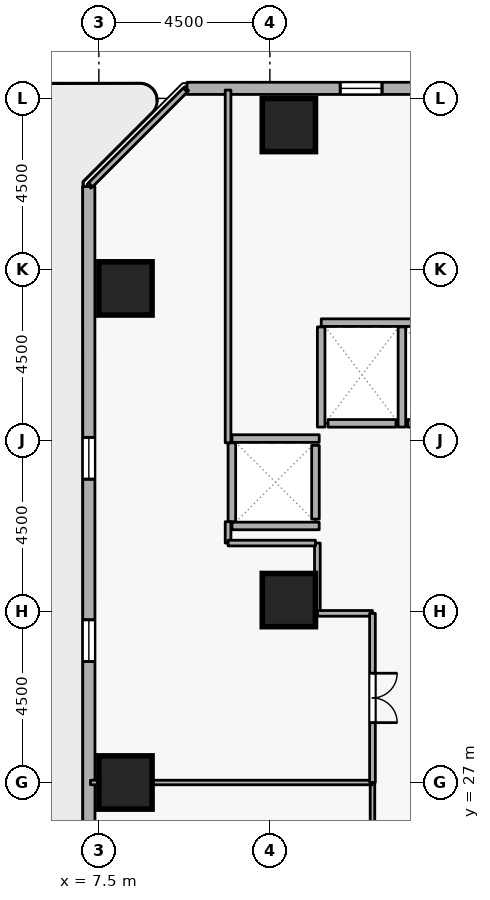
"""IFC4 building model, lengths in metres.
Left out: names, types, materials, properties, quantities, classifications, styles, units other than length and angle.
Written with IfcOpenShell. Run it as: python <this file> out.ifc"""

import sys

from ifc_helpers import new_model, si_unit, direction, frame, frame_2d, origin, origin_2d, place, context, subcontext, project, spatial, rectangle, extrude, element, fill, save


model = new_model("IFC4")
c1 = context("Model", 3, precision=1e-05, world=origin(), true_north=direction((0.0, 1.0)))
c2 = subcontext(c1, "Body", "Model", "MODEL_VIEW")
j1 = project(units=[si_unit("LENGTHUNIT", "METRE"), si_unit("PLANEANGLEUNIT", "RADIAN")], contexts=[c1])
p1 = place(None, origin())
s1 = spatial("IfcSite", under=j1, at=p1, CompositionType="ELEMENT")
p2 = place(p1, origin())
s2 = spatial("IfcBuilding", under=s1, at=p2, CompositionType="ELEMENT")
p3 = place(p2, frame((0.0, 0.0, 49.5)))
s3 = spatial("IfcBuildingStorey", under=s2, at=p3, CompositionType="ELEMENT", Elevation=49.5)
for number, where, z_axis, x_axis in (
    (1, (12.5, 44.3, 0.0), (0.0, 0.0, 1.0), (1.0, 0.0, 0.0)),
    (2, (8.2, 27.0, 0.0), (0.0, 0.0, 1.0), (1.0, 0.0, 0.0)),
    (3, (8.2, 40.0, 0.0), (0.0, 0.0, 1.0), (1.0, 0.0, 0.0)),
    (4, (12.5, 31.8, 0.0), (0.0, 0.0, 1.0), (1.0, 0.0, 0.0)),
):
    element("IfcColumn", number, at=place(p3, frame(where, z_axis=z_axis, x_axis=x_axis)), inside=s3, PredefinedType="COLUMN", context=c2, shape_type="SweptSolid", body=[
        extrude(rectangle(XDim=1.4, YDim=1.4, at=origin_2d()), origin(), (0.0, 0.0, 1.0), 4.2),
    ])
p4 = place(p3, frame((45.552, 45.26, 0.0), z_axis=(0.0, 0.0, 1.0), x_axis=(-0.999999988703, 0.000150313265, 0.0)))
e5 = element("IfcWall", 5, at=p4, inside=s3, PredefinedType="STANDARD", context=c2, shape_type="SweptSolid", body=[
    extrude(rectangle(XDim=35.733, YDim=0.32, at=frame_2d((17.866, 0.0))), origin(), (0.0, 0.0, 1.0), 3.3),
])
p5 = place(p4, frame((1.8, 0.0, 0.72)))
e6 = element("IfcOpeningElement", 6, at=p5, cuts=e5, PredefinedType="OPENING", context=c2, shape_type="SweptSolid", body=[
    extrude(rectangle(XDim=1.1, YDim=1.8, at=frame_2d((0.55, 0.9))), frame((0.0, 0.17, 0.0), z_axis=(0.0, -1.0, 0.0), x_axis=(1.0, 0.0, 0.0)), (0.0, 0.0, 1.0), 0.34),
])
p6 = place(p4, frame((11.4, 0.0, 0.72)))
e7 = element("IfcOpeningElement", 7, at=p6, cuts=e5, PredefinedType="OPENING", context=c2, shape_type="SweptSolid", body=[
    extrude(rectangle(XDim=1.1, YDim=1.8, at=frame_2d((0.55, 0.9))), frame((0.0, 0.17, 0.0), z_axis=(0.0, -1.0, 0.0), x_axis=(1.0, 0.0, 0.0)), (0.0, 0.0, 1.0), 0.34),
])
p7 = place(p4, frame((16.2, 0.0, 0.72)))
e8 = element("IfcOpeningElement", 8, at=p7, cuts=e5, PredefinedType="OPENING", context=c2, shape_type="SweptSolid", body=[
    extrude(rectangle(XDim=1.1, YDim=1.8, at=frame_2d((0.55, 0.9))), frame((0.0, 0.17, 0.0), z_axis=(0.0, -1.0, 0.0), x_axis=(1.0, 0.0, 0.0)), (0.0, 0.0, 1.0), 0.34),
])
p8 = place(p4, frame((25.8, 0.0, 0.72)))
e9 = element("IfcOpeningElement", 9, at=p8, cuts=e5, PredefinedType="OPENING", context=c2, shape_type="SweptSolid", body=[
    extrude(rectangle(XDim=1.1, YDim=1.8, at=frame_2d((0.55, 0.9))), frame((0.0, 0.17, 0.0), z_axis=(0.0, -1.0, 0.0), x_axis=(1.0, 0.0, 0.0)), (0.0, 0.0, 1.0), 0.34),
])
p9 = place(p4, frame((30.6, 0.0, 0.72)))
e10 = element("IfcOpeningElement", 10, at=p9, cuts=e5, PredefinedType="OPENING", context=c2, shape_type="SweptSolid", body=[
    extrude(rectangle(XDim=1.1, YDim=1.8, at=frame_2d((0.55, 0.9))), frame((0.0, 0.17, 0.0), z_axis=(0.0, -1.0, 0.0), x_axis=(1.0, 0.0, 0.0)), (0.0, 0.0, 1.0), 0.34),
])
p10 = place(p3, frame((7.235, 42.681, 0.0), z_axis=(0.0, 0.0, 1.0), x_axis=(0.000150313265, -0.999999988703, 0.0)))
e11 = element("IfcWall", 11, at=p10, inside=s3, PredefinedType="STANDARD", context=c2, shape_type="SweptSolid", body=[
    extrude(rectangle(XDim=35.733, YDim=0.32, at=frame_2d((17.866, 0.0))), origin(), (0.0, 0.0, 1.0), 3.3),
])
p11 = place(p10, frame((19.591, 0.0, 0.0)))
e12 = element("IfcOpeningElement", 12, at=p11, cuts=e11, PredefinedType="OPENING", context=c2, shape_type="SweptSolid", body=[
    extrude(rectangle(XDim=1.15, YDim=2.1, at=frame_2d((0.575, 1.05))), frame((0.0, 0.17, 0.0), z_axis=(0.0, -1.0, 0.0), x_axis=(1.0, 0.0, 0.0)), (0.0, 0.0, 1.0), 0.34),
])
p12 = place(p10, frame((6.6, 0.0, 0.72)))
e13 = element("IfcOpeningElement", 13, at=p12, cuts=e11, PredefinedType="OPENING", context=c2, shape_type="SweptSolid", body=[
    extrude(rectangle(XDim=1.1, YDim=1.8, at=frame_2d((0.55, 0.9))), frame((0.0, 0.17, 0.0), z_axis=(0.0, -1.0, 0.0), x_axis=(1.0, 0.0, 0.0)), (0.0, 0.0, 1.0), 0.34),
])
p13 = place(p10, frame((11.4, 0.0, 0.72)))
e14 = element("IfcOpeningElement", 14, at=p13, cuts=e11, PredefinedType="OPENING", context=c2, shape_type="SweptSolid", body=[
    extrude(rectangle(XDim=1.1, YDim=1.8, at=frame_2d((0.55, 0.9))), frame((0.0, 0.17, 0.0), z_axis=(0.0, -1.0, 0.0), x_axis=(1.0, 0.0, 0.0)), (0.0, 0.0, 1.0), 0.34),
])
p14 = place(p10, frame((25.8, 0.0, 0.72)))
e15 = element("IfcOpeningElement", 15, at=p14, cuts=e11, PredefinedType="OPENING", context=c2, shape_type="SweptSolid", body=[
    extrude(rectangle(XDim=1.1, YDim=1.8, at=frame_2d((0.55, 0.9))), frame((0.0, 0.17, 0.0), z_axis=(0.0, -1.0, 0.0), x_axis=(1.0, 0.0, 0.0)), (0.0, 0.0, 1.0), 0.34),
])
p15 = place(p3, frame((17.37, 36.45, 0.0), z_axis=(0.0, 0.0, 1.0), x_axis=(-1.0, 0.0, 0.0)))
e16 = element("IfcWall", 16, at=p15, inside=s3, PredefinedType="STANDARD", context=c2, shape_type="SweptSolid", body=[
    extrude(rectangle(XDim=1.74, YDim=0.2, at=frame_2d((0.87, 0.0))), origin(), (0.0, 0.0, 1.0), 3.94),
])
p16 = place(p3, frame((15.32, 36.45, 0.0), z_axis=(0.0, 0.0, 1.0), x_axis=(-1.0, 0.0, 0.0)))
e17 = element("IfcWall", 17, at=p16, inside=s3, PredefinedType="STANDARD", context=c2, shape_type="SweptSolid", body=[
    extrude(rectangle(XDim=1.79, YDim=0.2, at=frame_2d((0.895, 0.0))), origin(), (0.0, 0.0, 1.0), 3.94),
])
p17 = place(p3, frame((13.2, 33.93, 0.0), z_axis=(0.0, 0.0, 1.0), x_axis=(0.0, 1.0, 0.0)))
e18 = element("IfcWall", 18, at=p17, inside=s3, PredefinedType="STANDARD", context=c2, shape_type="SweptSolid", body=[
    extrude(rectangle(XDim=1.94, YDim=0.2, at=frame_2d((0.97, 0.0))), origin(), (0.0, 0.0, 1.0), 3.94),
])
p18 = place(p3, frame((13.352, 39.1, 0.0), z_axis=(0.0, 0.0, 1.0), x_axis=(1.0, 0.0, 0.0)))
e19 = element("IfcWall", 19, at=p18, inside=s3, PredefinedType="STANDARD", context=c2, shape_type="SweptSolid", body=[
    extrude(rectangle(XDim=4.196, YDim=0.2, at=frame_2d((2.098, 0.0))), origin(), (0.0, 0.0, 1.0), 3.94),
])
for number, where, z_axis, x_axis in (
    (20, (15.475, 36.352, 0.0), (0.0, 0.0, 1.0), (0.0, 1.0, 0.0)),
    (21, (13.35, 36.352, 0.0), (0.0, 0.0, 1.0), (0.0, 1.0, 0.0)),
):
    element("IfcWall", number, at=place(p3, frame(where, z_axis=z_axis, x_axis=x_axis)), inside=s3, PredefinedType="STANDARD", context=c2, shape_type="SweptSolid", body=[
        extrude(rectangle(XDim=2.636, YDim=0.2, at=frame_2d((1.318, 0.0))), origin(), (0.0, 0.0, 1.0), 3.94),
    ])
for number, where, z_axis, x_axis in (
    (22, (11.002, 36.05, 0.0), (0.0, 0.0, 1.0), (1.0, 0.0, 0.0)),
    (23, (11.002, 33.75, 0.0), (0.0, 0.0, 1.0), (1.0, 0.0, 0.0)),
):
    element("IfcWall", number, at=place(p3, frame(where, z_axis=z_axis, x_axis=x_axis)), inside=s3, PredefinedType="STANDARD", context=c2, shape_type="SweptSolid", body=[
        extrude(rectangle(XDim=2.296, YDim=0.2, at=frame_2d((1.148, 0.0))), origin(), (0.0, 0.0, 1.0), 3.94),
    ])
p19 = place(p3, frame((11.0, 33.862, 0.0), z_axis=(0.0, 0.0, 1.0), x_axis=(0.0, 1.0, 0.0)))
e24 = element("IfcWall", 24, at=p19, inside=s3, PredefinedType="STANDARD", context=c2, shape_type="SweptSolid", body=[
    extrude(rectangle(XDim=2.076, YDim=0.2, at=frame_2d((1.038, 0.0))), origin(), (0.0, 0.0, 1.0), 3.94),
])
p20 = place(p3, frame((14.7, 27.0, 0.0), z_axis=(0.0, 0.0, 1.0), x_axis=(0.0, -1.0, 0.0)))
e25 = element("IfcWall", 25, at=p20, inside=s3, PredefinedType="PARTITIONING", context=c2, shape_type="SweptSolid", body=[
    extrude(rectangle(XDim=4.45, YDim=0.12, at=frame_2d((2.225, 0.0))), origin(), (0.0, 0.0, 1.0), 3.94),
])
p21 = place(p3, frame((7.28, 27.0, 0.0), z_axis=(0.0, 0.0, 1.0), x_axis=(1.0, 0.0, 0.0)))
e26 = element("IfcWall", 26, at=p21, inside=s3, PredefinedType="PARTITIONING", context=c2, shape_type="SweptSolid", body=[
    extrude(rectangle(XDim=7.42, YDim=0.12, at=frame_2d((3.71, 0.0))), origin(), (0.0, 0.0, 1.0), 3.532),
])
p22 = place(p3, frame((13.25, 33.3, 0.0), z_axis=(0.0, 0.0, 1.0), x_axis=(0.0, -1.0, 0.0)))
e27 = element("IfcWall", 27, at=p22, inside=s3, PredefinedType="PARTITIONING", context=c2, shape_type="SweptSolid", body=[
    extrude(rectangle(XDim=1.85, YDim=0.15, at=frame_2d((0.925, 0.0))), origin(), (0.0, 0.0, 1.0), 3.94),
])
p23 = place(p3, frame((13.25, 31.45, 0.0), z_axis=(0.0, 0.0, 1.0), x_axis=(1.0, 0.0, 0.0)))
e28 = element("IfcWall", 28, at=p23, inside=s3, PredefinedType="PARTITIONING", context=c2, shape_type="SweptSolid", body=[
    extrude(rectangle(XDim=1.45, YDim=0.15, at=frame_2d((0.725, 0.0))), origin(), (0.0, 0.0, 1.0), 3.94),
])
p24 = place(p3, frame((14.7, 31.45, 0.0), z_axis=(0.0, 0.0, 1.0), x_axis=(0.0, -1.0, 0.0)))
e29 = element("IfcWall", 29, at=p24, inside=s3, PredefinedType="PARTITIONING", context=c2, shape_type="SweptSolid", body=[
    extrude(rectangle(XDim=4.45, YDim=0.15, at=frame_2d((2.225, 0.0))), origin(), (0.0, 0.0, 1.0), 3.94),
])
p25 = place(p24, frame((1.575, 0.0, 0.0)))
e30 = element("IfcOpeningElement", 30, at=p25, cuts=e29, PredefinedType="OPENING", context=c2, shape_type="SweptSolid", body=[
    extrude(rectangle(XDim=1.3, YDim=2.12, at=frame_2d((0.65, 1.06))), frame((0.0, 0.085, 0.0), z_axis=(0.0, -1.0, 0.0), x_axis=(1.0, 0.0, 0.0)), (0.0, 0.0, 1.0), 0.17),
])
p26 = place(p3, frame((7.28, 42.725, 0.0), z_axis=(0.0, 0.0, 1.0), x_axis=(0.707106781187, 0.707106781187, 0.0)))
e31 = element("IfcWall", 31, at=p26, inside=s3, PredefinedType="PARTITIONING", context=c2, shape_type="SweptSolid", body=[
    extrude(rectangle(XDim=3.528, YDim=0.15, at=frame_2d((1.764, 0.0))), origin(), (0.0, 0.0, 1.0), 3.94),
])
p27 = place(p3, frame((10.9, 45.22, 0.0), z_axis=(0.0, 0.0, 1.0), x_axis=(0.0, -1.0, 0.0)))
e32 = element("IfcWall", 32, at=p27, inside=s3, PredefinedType="PARTITIONING", context=c2, shape_type="SweptSolid", body=[
    extrude(rectangle(XDim=9.282, YDim=0.15, at=frame_2d((4.641, 0.0))), origin(), (0.0, 0.0, 1.0), 3.94),
])
p28 = place(p3, frame((10.9, 33.862, 0.0), z_axis=(0.0, 0.0, 1.0), x_axis=(0.0, -1.0, 0.0)))
e33 = element("IfcWall", 33, at=p28, inside=s3, PredefinedType="PARTITIONING", context=c2, shape_type="SweptSolid", body=[
    extrude(rectangle(XDim=0.562, YDim=0.15, at=frame_2d((0.281, 0.0))), origin(), (0.0, 0.0, 1.0), 3.94),
])
p29 = place(p3, frame((10.9, 33.3, 0.0), z_axis=(0.0, 0.0, 1.0), x_axis=(1.0, 0.0, 0.0)))
e34 = element("IfcWall", 34, at=p29, inside=s3, PredefinedType="PARTITIONING", context=c2, shape_type="SweptSolid", body=[
    extrude(rectangle(XDim=2.3, YDim=0.15, at=frame_2d((1.15, 0.0))), origin(), (0.0, 0.0, 1.0), 3.94),
])
p30 = place(p9, origin())
e35 = element("IfcWindow", 35, at=p30, inside=s3, PartitioningType="SINGLE_PANEL", PredefinedType="WINDOW", context=c2, shape_type="SweptSolid", body=[
    extrude(rectangle(XDim=1.1, YDim=1.8, at=frame_2d((0.55, 0.9))), frame((0.0, 0.03, 0.0), z_axis=(0.0, -1.0, 0.0), x_axis=(1.0, 0.0, 0.0)), (0.0, 0.0, 1.0), 0.06),
])
fill(e10, e35)
p31 = place(p12, origin())
e36 = element("IfcWindow", 36, at=p31, inside=s3, PartitioningType="SINGLE_PANEL", PredefinedType="WINDOW", context=c2, shape_type="SweptSolid", body=[
    extrude(rectangle(XDim=1.1, YDim=1.8, at=frame_2d((0.55, 0.9))), frame((0.0, 0.03, 0.0), z_axis=(0.0, -1.0, 0.0), x_axis=(1.0, 0.0, 0.0)), (0.0, 0.0, 1.0), 0.06),
])
fill(e13, e36)
p32 = place(p13, origin())
e37 = element("IfcWindow", 37, at=p32, inside=s3, PartitioningType="SINGLE_PANEL", PredefinedType="WINDOW", context=c2, shape_type="SweptSolid", body=[
    extrude(rectangle(XDim=1.1, YDim=1.8, at=frame_2d((0.55, 0.9))), frame((0.0, 0.03, 0.0), z_axis=(0.0, -1.0, 0.0), x_axis=(1.0, 0.0, 0.0)), (0.0, 0.0, 1.0), 0.06),
])
fill(e14, e37)
p33 = place(p25, origin())
e38 = element("IfcDoor", 38, at=p33, inside=s3, OperationType="DOUBLE_DOOR_SINGLE_SWING", PredefinedType="DOOR", context=c2, shape_type="SweptSolid", body=[
    extrude(rectangle(XDim=1.3, YDim=2.12, at=frame_2d((0.65, 1.06))), frame((0.0, 0.025, 0.0), z_axis=(0.0, -1.0, 0.0), x_axis=(1.0, 0.0, 0.0)), (0.0, 0.0, 1.0), 0.05),
])
fill(e30, e38)
save(model, sys.argv[1])
